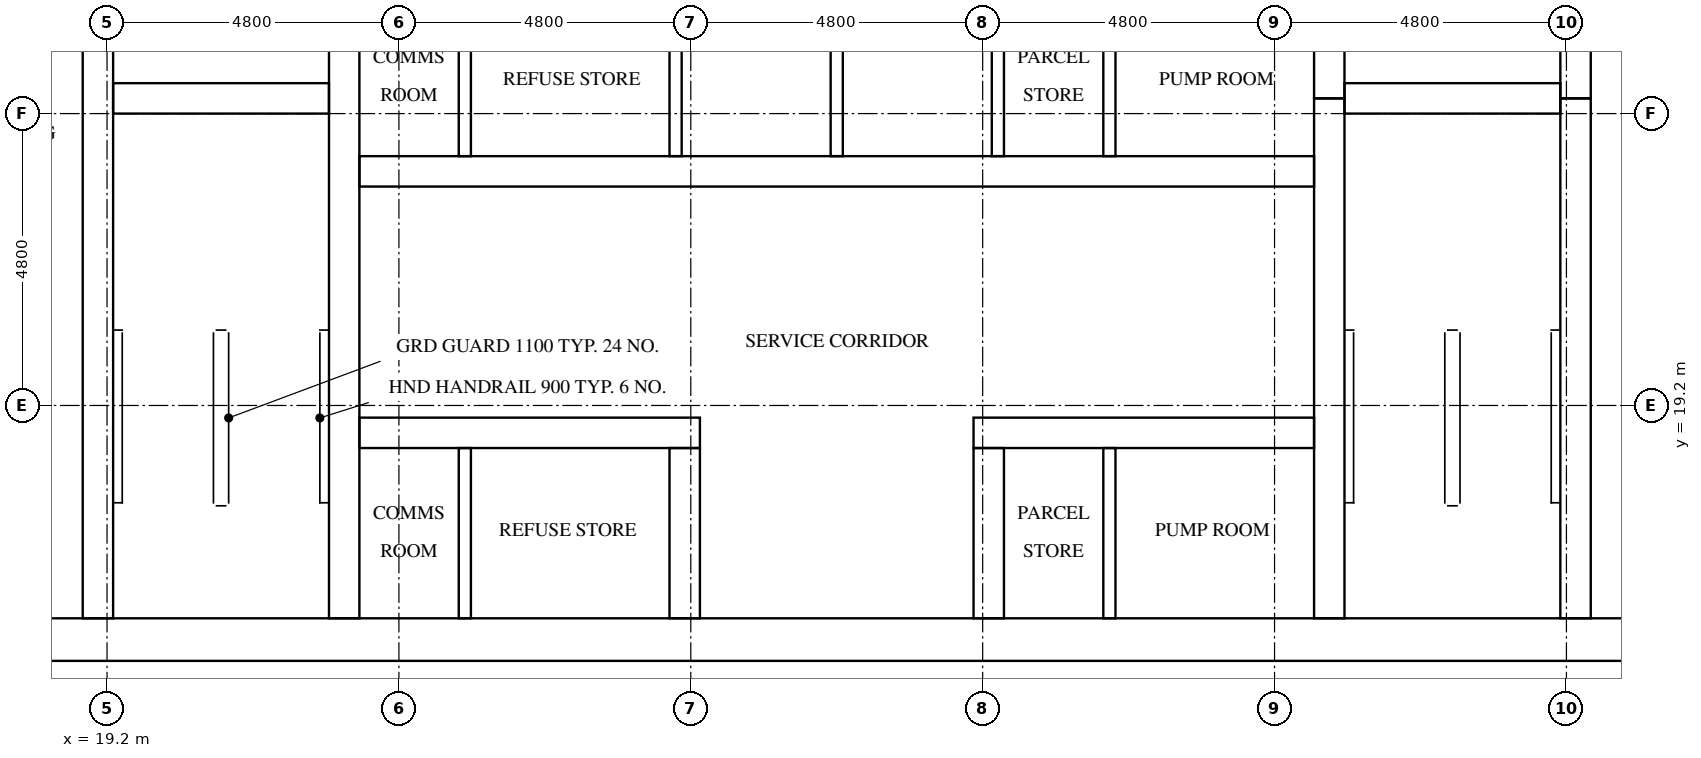
"""IFC4 building model, lengths in metres.
Left out: names, types, materials, properties, quantities, classifications, styles, units other than length and angle.
Written with IfcOpenShell. Run it as: python <this file> out.ifc"""

import sys

from ifc_helpers import new_model, si_unit, direction, frame, frame_2d, origin, place, context, subcontext, project, spatial, rectangle, extrude, element, fill, save


model = new_model("IFC4")
c1 = context("Model", 3, precision=1e-05, world=origin(), true_north=direction((0.0, 1.0)))
c2 = subcontext(c1, "Body", "Model", "MODEL_VIEW")
j1 = project(units=[si_unit("LENGTHUNIT", "METRE"), si_unit("PLANEANGLEUNIT", "RADIAN")], contexts=[c1])
p1 = place(None, origin())
s1 = spatial("IfcSite", under=j1, at=p1, CompositionType="ELEMENT")
p2 = place(p1, origin())
s2 = spatial("IfcBuilding", under=s1, at=p2, CompositionType="ELEMENT")
p3 = place(p2, frame((0.0, 0.0, 199.9)))
s3 = spatial("IfcBuildingStorey", under=s2, at=p3, CompositionType="ELEMENT", Elevation=199.9)
p4 = place(p3, frame((15.0, 15.35, 0.0), z_axis=(0.0, 0.0, 1.0), x_axis=(1.0, 0.0, 0.0)))
e1 = element("IfcWall", 1, at=p4, inside=s3, PredefinedType="SHEAR", context=c2, shape_type="SweptSolid", body=[
    extrude(rectangle(XDim=32.4, YDim=0.7, at=frame_2d((16.2, 0.0))), origin(), (0.0, 0.0, 1.0), 3.1),
])
p5 = place(p4, frame((15.3, 0.0, 0.0)))
e2 = element("IfcOpeningElement", 2, at=p5, cuts=e1, PredefinedType="OPENING", context=c2, shape_type="SweptSolid", body=[
    extrude(rectangle(XDim=1.8, YDim=2.1, at=frame_2d((0.9, 1.05))), frame((0.0, 0.36, 0.0), z_axis=(0.0, -1.0, 0.0), x_axis=(1.0, 0.0, 0.0)), (0.0, 0.0, 1.0), 0.72),
])
p6 = place(p3, frame((19.05, 15.7, 0.0), z_axis=(0.0, 0.0, 1.0), x_axis=(0.0, 1.0, 0.0)))
e3 = element("IfcWall", 3, at=p6, inside=s3, PredefinedType="SHEAR", context=c2, shape_type="SweptSolid", body=[
    extrude(rectangle(XDim=15.3, YDim=0.5, at=frame_2d((7.65, 0.0))), origin(), (0.0, 0.0, 1.0), 3.1),
])
p7 = place(p6, frame((9.75, 0.0, 0.0)))
e4 = element("IfcOpeningElement", 4, at=p7, cuts=e3, PredefinedType="OPENING", context=c2, shape_type="SweptSolid", body=[
    extrude(rectangle(XDim=1.1, YDim=2.1, at=frame_2d((0.55, 1.05))), frame((0.0, 0.26, 0.0), z_axis=(0.0, -1.0, 0.0), x_axis=(1.0, 0.0, 0.0)), (0.0, 0.0, 1.0), 0.52),
])
p8 = place(p6, frame((13.25, 0.0, 0.0)))
e5 = element("IfcOpeningElement", 5, at=p8, cuts=e3, PredefinedType="OPENING", context=c2, shape_type="SweptSolid", body=[
    extrude(rectangle(XDim=1.1, YDim=2.1, at=frame_2d((0.55, 1.05))), frame((0.0, 0.26, 0.0), z_axis=(0.0, -1.0, 0.0), x_axis=(1.0, 0.0, 0.0)), (0.0, 0.0, 1.0), 0.52),
])
p9 = place(p6, frame((0.5, 0.0, 0.0)))
e6 = element("IfcOpeningElement", 6, at=p9, cuts=e3, PredefinedType="OPENING", context=c2, shape_type="SweptSolid", body=[
    extrude(rectangle(XDim=1.2, YDim=2.1, at=frame_2d((0.6, 1.05))), frame((0.0, 0.26, 0.0), z_axis=(0.0, -1.0, 0.0), x_axis=(1.0, 0.0, 0.0)), (0.0, 0.0, 1.0), 0.52),
])
p10 = place(p3, frame((23.1, 15.7, 0.0), z_axis=(0.0, 0.0, 1.0), x_axis=(0.0, 1.0, 0.0)))
e7 = element("IfcWall", 7, at=p10, inside=s3, PredefinedType="SHEAR", context=c2, shape_type="SweptSolid", body=[
    extrude(rectangle(XDim=21.4, YDim=0.5, at=frame_2d((10.7, 0.0))), origin(), (0.0, 0.0, 1.0), 3.1),
])
p11 = place(p3, frame((39.3, 15.7, 0.0), z_axis=(0.0, 0.0, 1.0), x_axis=(0.0, 1.0, 0.0)))
e8 = element("IfcWall", 8, at=p11, inside=s3, PredefinedType="SHEAR", context=c2, shape_type="SweptSolid", body=[
    extrude(rectangle(XDim=8.55, YDim=0.5, at=frame_2d((4.275, 0.0))), origin(), (0.0, 0.0, 1.0), 3.1),
])
p12 = place(p3, frame((39.3, 24.25, 0.0), z_axis=(0.0, 0.0, 1.0), x_axis=(0.0, 1.0, 0.0)))
e9 = element("IfcWall", 9, at=p12, inside=s3, PredefinedType="SHEAR", context=c2, shape_type="SweptSolid", body=[
    extrude(rectangle(XDim=3.5, YDim=0.5, at=frame_2d((1.75, 0.0))), origin(), (0.0, 0.0, 1.0), 3.1),
])
p13 = place(p3, frame((43.35, 15.7, 0.0), z_axis=(0.0, 0.0, 1.0), x_axis=(0.0, 1.0, 0.0)))
e10 = element("IfcWall", 10, at=p13, inside=s3, PredefinedType="SHEAR", context=c2, shape_type="SweptSolid", body=[
    extrude(rectangle(XDim=8.55, YDim=0.5, at=frame_2d((4.275, 0.0))), origin(), (0.0, 0.0, 1.0), 3.1),
])
p14 = place(p13, frame((0.5, 0.0, 0.0)))
e11 = element("IfcOpeningElement", 11, at=p14, cuts=e10, PredefinedType="OPENING", context=c2, shape_type="SweptSolid", body=[
    extrude(rectangle(XDim=1.2, YDim=2.1, at=frame_2d((0.6, 1.05))), frame((0.0, 0.26, 0.0), z_axis=(0.0, -1.0, 0.0), x_axis=(1.0, 0.0, 0.0)), (0.0, 0.0, 1.0), 0.52),
])
p15 = place(p3, frame((43.35, 24.25, 0.0), z_axis=(0.0, 0.0, 1.0), x_axis=(0.0, 1.0, 0.0)))
e12 = element("IfcWall", 12, at=p15, inside=s3, PredefinedType="SHEAR", context=c2, shape_type="SweptSolid", body=[
    extrude(rectangle(XDim=3.5, YDim=0.5, at=frame_2d((1.75, 0.0))), origin(), (0.0, 0.0, 1.0), 3.1),
])
p16 = place(p15, frame((1.2, 0.0, 0.0)))
e13 = element("IfcOpeningElement", 13, at=p16, cuts=e12, PredefinedType="OPENING", context=c2, shape_type="SweptSolid", body=[
    extrude(rectangle(XDim=1.1, YDim=2.1, at=frame_2d((0.55, 1.05))), frame((0.0, 0.26, 0.0), z_axis=(0.0, -1.0, 0.0), x_axis=(1.0, 0.0, 0.0)), (0.0, 0.0, 1.0), 0.52),
])
for number, where, z_axis, x_axis in (
    (14, (19.3, 24.25, 0.0), (0.0, 0.0, 1.0), (1.0, 0.0, 0.0)),
    (15, (39.55, 24.25, 0.0), (0.0, 0.0, 1.0), (1.0, 0.0, 0.0)),
):
    element("IfcWall", number, at=place(p3, frame(where, z_axis=z_axis, x_axis=x_axis)), inside=s3, PredefinedType="SHEAR", context=c2, shape_type="SweptSolid", body=[
        extrude(rectangle(XDim=3.55, YDim=0.5, at=frame_2d((1.775, 0.0))), origin(), (0.0, 0.0, 1.0), 3.1),
    ])
p17 = place(p3, frame((23.35, 18.75, 0.0), z_axis=(0.0, 0.0, 1.0), x_axis=(1.0, 0.0, 0.0)))
e16 = element("IfcWall", 16, at=p17, inside=s3, PredefinedType="SHEAR", context=c2, shape_type="SweptSolid", body=[
    extrude(rectangle(XDim=5.6, YDim=0.5, at=frame_2d((2.8, 0.0))), origin(), (0.0, 0.0, 1.0), 3.1),
])
p18 = place(p17, frame((0.317, 0.0, 0.0)))
e17 = element("IfcOpeningElement", 17, at=p18, cuts=e16, PredefinedType="OPENING", context=c2, shape_type="SweptSolid", body=[
    extrude(rectangle(XDim=1.0, YDim=2.1, at=frame_2d((0.5, 1.05))), frame((0.0, 0.26, 0.0), z_axis=(0.0, -1.0, 0.0), x_axis=(1.0, 0.0, 0.0)), (0.0, 0.0, 1.0), 0.52),
])
p19 = place(p17, frame((2.967, 0.0, 0.0)))
e18 = element("IfcOpeningElement", 18, at=p19, cuts=e16, PredefinedType="OPENING", context=c2, shape_type="SweptSolid", body=[
    extrude(rectangle(XDim=1.0, YDim=2.1, at=frame_2d((0.5, 1.05))), frame((0.0, 0.26, 0.0), z_axis=(0.0, -1.0, 0.0), x_axis=(1.0, 0.0, 0.0)), (0.0, 0.0, 1.0), 0.52),
])
p20 = place(p3, frame((33.45, 18.75, 0.0), z_axis=(0.0, 0.0, 1.0), x_axis=(1.0, 0.0, 0.0)))
e19 = element("IfcWall", 19, at=p20, inside=s3, PredefinedType="SHEAR", context=c2, shape_type="SweptSolid", body=[
    extrude(rectangle(XDim=5.6, YDim=0.5, at=frame_2d((2.8, 0.0))), origin(), (0.0, 0.0, 1.0), 3.1),
])
p21 = place(p20, frame((0.817, 0.0, 0.0)))
e20 = element("IfcOpeningElement", 20, at=p21, cuts=e19, PredefinedType="OPENING", context=c2, shape_type="SweptSolid", body=[
    extrude(rectangle(XDim=1.0, YDim=2.1, at=frame_2d((0.5, 1.05))), frame((0.0, 0.26, 0.0), z_axis=(0.0, -1.0, 0.0), x_axis=(1.0, 0.0, 0.0)), (0.0, 0.0, 1.0), 0.52),
])
p22 = place(p20, frame((3.467, 0.0, 0.0)))
e21 = element("IfcOpeningElement", 21, at=p22, cuts=e19, PredefinedType="OPENING", context=c2, shape_type="SweptSolid", body=[
    extrude(rectangle(XDim=1.0, YDim=2.1, at=frame_2d((0.5, 1.05))), frame((0.0, 0.26, 0.0), z_axis=(0.0, -1.0, 0.0), x_axis=(1.0, 0.0, 0.0)), (0.0, 0.0, 1.0), 0.52),
])
p23 = place(p3, frame((23.35, 23.05, 0.0), z_axis=(0.0, 0.0, 1.0), x_axis=(1.0, 0.0, 0.0)))
e22 = element("IfcWall", 22, at=p23, inside=s3, PredefinedType="SHEAR", context=c2, shape_type="SweptSolid", body=[
    extrude(rectangle(XDim=15.7, YDim=0.5, at=frame_2d((7.85, 0.0))), origin(), (0.0, 0.0, 1.0), 3.1),
])
p24 = place(p23, frame((0.317, 0.0, 0.0)))
e23 = element("IfcOpeningElement", 23, at=p24, cuts=e22, PredefinedType="OPENING", context=c2, shape_type="SweptSolid", body=[
    extrude(rectangle(XDim=1.0, YDim=2.1, at=frame_2d((0.5, 1.05))), frame((0.0, 0.26, 0.0), z_axis=(0.0, -1.0, 0.0), x_axis=(1.0, 0.0, 0.0)), (0.0, 0.0, 1.0), 0.52),
])
p25 = place(p23, frame((2.967, 0.0, 0.0)))
e24 = element("IfcOpeningElement", 24, at=p25, cuts=e22, PredefinedType="OPENING", context=c2, shape_type="SweptSolid", body=[
    extrude(rectangle(XDim=1.0, YDim=2.1, at=frame_2d((0.5, 1.05))), frame((0.0, 0.26, 0.0), z_axis=(0.0, -1.0, 0.0), x_axis=(1.0, 0.0, 0.0)), (0.0, 0.0, 1.0), 0.52),
])
p26 = place(p23, frame((10.917, 0.0, 0.0)))
e25 = element("IfcOpeningElement", 25, at=p26, cuts=e22, PredefinedType="OPENING", context=c2, shape_type="SweptSolid", body=[
    extrude(rectangle(XDim=1.0, YDim=2.1, at=frame_2d((0.5, 1.05))), frame((0.0, 0.26, 0.0), z_axis=(0.0, -1.0, 0.0), x_axis=(1.0, 0.0, 0.0)), (0.0, 0.0, 1.0), 0.52),
])
p27 = place(p23, frame((13.567, 0.0, 0.0)))
e26 = element("IfcOpeningElement", 26, at=p27, cuts=e22, PredefinedType="OPENING", context=c2, shape_type="SweptSolid", body=[
    extrude(rectangle(XDim=1.0, YDim=2.1, at=frame_2d((0.5, 1.05))), frame((0.0, 0.26, 0.0), z_axis=(0.0, -1.0, 0.0), x_axis=(1.0, 0.0, 0.0)), (0.0, 0.0, 1.0), 0.52),
])
for number, where, z_axis, x_axis in (
    (27, (28.7, 15.7, 0.0), (0.0, 0.0, 1.0), (0.0, 1.0, 0.0)),
    (28, (33.7, 15.7, 0.0), (0.0, 0.0, 1.0), (0.0, 1.0, 0.0)),
):
    element("IfcWall", number, at=place(p3, frame(where, z_axis=z_axis, x_axis=x_axis)), inside=s3, PredefinedType="SHEAR", context=c2, shape_type="SweptSolid", body=[
        extrude(rectangle(XDim=2.8, YDim=0.5, at=frame_2d((1.4, 0.0))), origin(), (0.0, 0.0, 1.0), 3.1),
    ])
for number, where, z_axis, x_axis in (
    (29, (28.55, 23.3, 0.0), (0.0, 0.0, 1.0), (0.0, 1.0, 0.0)),
    (30, (31.2, 23.3, 0.0), (0.0, 0.0, 1.0), (0.0, 1.0, 0.0)),
    (31, (33.85, 23.3, 0.0), (0.0, 0.0, 1.0), (0.0, 1.0, 0.0)),
):
    element("IfcWall", number, at=place(p3, frame(where, z_axis=z_axis, x_axis=x_axis)), inside=s3, PredefinedType="SOLIDWALL", context=c2, shape_type="SweptSolid", body=[
        extrude(rectangle(XDim=2.6, YDim=0.2, at=frame_2d((1.3, 0.0))), origin(), (0.0, 0.0, 1.0), 3.1),
    ])
for number, where, z_axis, x_axis in (
    (32, (25.084, 23.3, 0.0), (0.0, 0.0, 1.0), (0.0, 1.0, 0.0)),
    (33, (35.684, 23.3, 0.0), (0.0, 0.0, 1.0), (0.0, 1.0, 0.0)),
):
    element("IfcWall", number, at=place(p3, frame(where, z_axis=z_axis, x_axis=x_axis)), inside=s3, PredefinedType="PARTITIONING", context=c2, shape_type="SweptSolid", body=[
        extrude(rectangle(XDim=2.6, YDim=0.2, at=frame_2d((1.3, 0.0))), origin(), (0.0, 0.0, 1.0), 3.1),
    ])
for number, where, z_axis, x_axis in (
    (34, (25.084, 15.7, 0.0), (0.0, 0.0, 1.0), (0.0, 1.0, 0.0)),
    (35, (35.684, 15.7, 0.0), (0.0, 0.0, 1.0), (0.0, 1.0, 0.0)),
):
    element("IfcWall", number, at=place(p3, frame(where, z_axis=z_axis, x_axis=x_axis)), inside=s3, PredefinedType="PARTITIONING", context=c2, shape_type="SweptSolid", body=[
        extrude(rectangle(XDim=2.8, YDim=0.2, at=frame_2d((1.4, 0.0))), origin(), (0.0, 0.0, 1.0), 3.1),
    ])
p28 = place(p9, frame((1.2, 0.0, 0.0), z_axis=(0.0, 0.0, 1.0), x_axis=(-1.0, 0.0, 0.0)))
e36 = element("IfcDoor", 36, at=p28, inside=s3, OperationType="SINGLE_SWING_RIGHT", PredefinedType="DOOR", context=c2, shape_type="SweptSolid", body=[
    extrude(rectangle(XDim=1.2, YDim=2.1, at=frame_2d((0.6, 1.05))), frame((0.0, 0.025, 0.0), z_axis=(0.0, -1.0, 0.0), x_axis=(1.0, 0.0, 0.0)), (0.0, 0.0, 1.0), 0.05),
])
fill(e6, e36)
p29 = place(p14, origin())
e37 = element("IfcDoor", 37, at=p29, inside=s3, OperationType="SINGLE_SWING_LEFT", PredefinedType="DOOR", context=c2, shape_type="SweptSolid", body=[
    extrude(rectangle(XDim=1.2, YDim=2.1, at=frame_2d((0.6, 1.05))), frame((0.0, 0.025, 0.0), z_axis=(0.0, -1.0, 0.0), x_axis=(1.0, 0.0, 0.0)), (0.0, 0.0, 1.0), 0.05),
])
fill(e11, e37)
p30 = place(p5, frame((1.8, 0.0, 0.0), z_axis=(0.0, 0.0, 1.0), x_axis=(-1.0, 0.0, 0.0)))
e38 = element("IfcDoor", 38, at=p30, inside=s3, OperationType="DOUBLE_DOOR_SINGLE_SWING", PredefinedType="DOOR", context=c2, shape_type="SweptSolid", body=[
    extrude(rectangle(XDim=1.8, YDim=2.1, at=frame_2d((0.9, 1.05))), frame((0.0, 0.025, 0.0), z_axis=(0.0, -1.0, 0.0), x_axis=(1.0, 0.0, 0.0)), (0.0, 0.0, 1.0), 0.05),
])
fill(e2, e38)
p31 = place(p24, frame((1.0, 0.0, 0.0), z_axis=(0.0, 0.0, 1.0), x_axis=(-1.0, 0.0, 0.0)))
e39 = element("IfcDoor", 39, at=p31, inside=s3, OperationType="SINGLE_SWING_LEFT", PredefinedType="DOOR", context=c2, shape_type="SweptSolid", body=[
    extrude(rectangle(XDim=1.0, YDim=2.1, at=frame_2d((0.5, 1.05))), frame((0.0, 0.025, 0.0), z_axis=(0.0, -1.0, 0.0), x_axis=(1.0, 0.0, 0.0)), (0.0, 0.0, 1.0), 0.05),
])
fill(e23, e39)
p32 = place(p25, frame((1.0, 0.0, 0.0), z_axis=(0.0, 0.0, 1.0), x_axis=(-1.0, 0.0, 0.0)))
e40 = element("IfcDoor", 40, at=p32, inside=s3, OperationType="SINGLE_SWING_RIGHT", PredefinedType="DOOR", context=c2, shape_type="SweptSolid", body=[
    extrude(rectangle(XDim=1.0, YDim=2.1, at=frame_2d((0.5, 1.05))), frame((0.0, 0.025, 0.0), z_axis=(0.0, -1.0, 0.0), x_axis=(1.0, 0.0, 0.0)), (0.0, 0.0, 1.0), 0.05),
])
fill(e24, e40)
p33 = place(p26, frame((1.0, 0.0, 0.0), z_axis=(0.0, 0.0, 1.0), x_axis=(-1.0, 0.0, 0.0)))
e41 = element("IfcDoor", 41, at=p33, inside=s3, OperationType="SINGLE_SWING_LEFT", PredefinedType="DOOR", context=c2, shape_type="SweptSolid", body=[
    extrude(rectangle(XDim=1.0, YDim=2.1, at=frame_2d((0.5, 1.05))), frame((0.0, 0.025, 0.0), z_axis=(0.0, -1.0, 0.0), x_axis=(1.0, 0.0, 0.0)), (0.0, 0.0, 1.0), 0.05),
])
fill(e25, e41)
p34 = place(p27, frame((1.0, 0.0, 0.0), z_axis=(0.0, 0.0, 1.0), x_axis=(-1.0, 0.0, 0.0)))
e42 = element("IfcDoor", 42, at=p34, inside=s3, OperationType="SINGLE_SWING_RIGHT", PredefinedType="DOOR", context=c2, shape_type="SweptSolid", body=[
    extrude(rectangle(XDim=1.0, YDim=2.1, at=frame_2d((0.5, 1.05))), frame((0.0, 0.025, 0.0), z_axis=(0.0, -1.0, 0.0), x_axis=(1.0, 0.0, 0.0)), (0.0, 0.0, 1.0), 0.05),
])
fill(e26, e42)
p35 = place(p18, origin())
e43 = element("IfcDoor", 43, at=p35, inside=s3, OperationType="SINGLE_SWING_LEFT", PredefinedType="DOOR", context=c2, shape_type="SweptSolid", body=[
    extrude(rectangle(XDim=1.0, YDim=2.1, at=frame_2d((0.5, 1.05))), frame((0.0, 0.025, 0.0), z_axis=(0.0, -1.0, 0.0), x_axis=(1.0, 0.0, 0.0)), (0.0, 0.0, 1.0), 0.05),
])
fill(e17, e43)
p36 = place(p19, origin())
e44 = element("IfcDoor", 44, at=p36, inside=s3, OperationType="SINGLE_SWING_RIGHT", PredefinedType="DOOR", context=c2, shape_type="SweptSolid", body=[
    extrude(rectangle(XDim=1.0, YDim=2.1, at=frame_2d((0.5, 1.05))), frame((0.0, 0.025, 0.0), z_axis=(0.0, -1.0, 0.0), x_axis=(1.0, 0.0, 0.0)), (0.0, 0.0, 1.0), 0.05),
])
fill(e18, e44)
p37 = place(p21, origin())
e45 = element("IfcDoor", 45, at=p37, inside=s3, OperationType="SINGLE_SWING_LEFT", PredefinedType="DOOR", context=c2, shape_type="SweptSolid", body=[
    extrude(rectangle(XDim=1.0, YDim=2.1, at=frame_2d((0.5, 1.05))), frame((0.0, 0.025, 0.0), z_axis=(0.0, -1.0, 0.0), x_axis=(1.0, 0.0, 0.0)), (0.0, 0.0, 1.0), 0.05),
])
fill(e20, e45)
p38 = place(p22, origin())
e46 = element("IfcDoor", 46, at=p38, inside=s3, OperationType="SINGLE_SWING_RIGHT", PredefinedType="DOOR", context=c2, shape_type="SweptSolid", body=[
    extrude(rectangle(XDim=1.0, YDim=2.1, at=frame_2d((0.5, 1.05))), frame((0.0, 0.025, 0.0), z_axis=(0.0, -1.0, 0.0), x_axis=(1.0, 0.0, 0.0)), (0.0, 0.0, 1.0), 0.05),
])
fill(e21, e46)
save(model, sys.argv[1])
